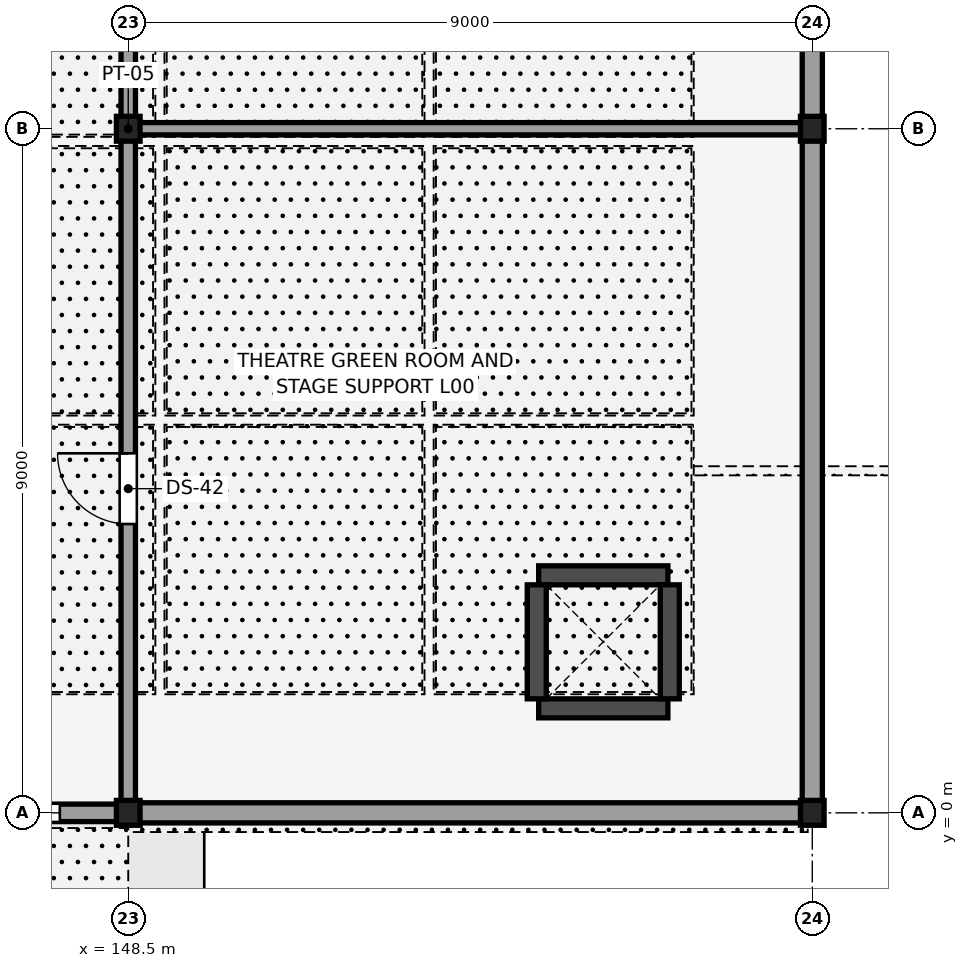
"""IFC4 building model, lengths in metres.
Left out: names, types, materials, properties, quantities, classifications, styles, units other than length and angle.
Written with IfcOpenShell. Run it as: python <this file> out.ifc"""

import sys

from ifc_helpers import new_model, si_unit, direction, frame, frame_2d, origin, origin_2d, place, context, subcontext, project, spatial, rectangle, i_section, extrude, element, fill, save


model = new_model("IFC4")
c1 = context("Model", 3, precision=1e-05, world=origin(), true_north=direction((0.0, 1.0)))
c2 = subcontext(c1, "Body", "Model", "MODEL_VIEW")
j1 = project(units=[si_unit("LENGTHUNIT", "METRE"), si_unit("PLANEANGLEUNIT", "RADIAN")], contexts=[c1])
p1 = place(None, origin())
s1 = spatial("IfcSite", under=j1, at=p1, CompositionType="ELEMENT")
p2 = place(p1, origin())
s2 = spatial("IfcBuilding", under=s1, at=p2, CompositionType="ELEMENT")
p3 = place(p2, origin())
s3 = spatial("IfcBuildingStorey", under=s2, at=p3, CompositionType="ELEMENT", Elevation=0.0)
for number, where, z_axis, x_axis in (
    (1, (148.5, 0.0, -0.24), (0.0, 0.0, 1.0), (1.0, 0.0, 0.0)),
    (2, (148.5, 9.0, -0.24), (0.0, 0.0, 1.0), (1.0, 0.0, 0.0)),
    (3, (157.5, 0.0, -0.24), (0.0, 0.0, 1.0), (1.0, 0.0, 0.0)),
    (4, (157.5, 9.0, -0.24), (0.0, 0.0, 1.0), (1.0, 0.0, 0.0)),
):
    element("IfcColumn", number, at=place(p3, frame(where, z_axis=z_axis, x_axis=x_axis)), inside=s3, PredefinedType="COLUMN", context=c2, shape_type="SweptSolid", body=[
        extrude(i_section(OverallWidth=0.311, OverallDepth=0.327, WebThickness=0.016, FlangeThickness=0.025, FilletRadius=0.017, at=origin_2d()), origin(), (0.0, 0.0, 1.0), 5.64),
    ])
for number, where, z_axis, x_axis in (
    (5, (153.9, 1.375, 0.0), (0.0, 0.0, 1.0), (1.0, 0.0, 0.0)),
    (6, (153.9, 3.125, 0.0), (0.0, 0.0, 1.0), (1.0, 0.0, 0.0)),
):
    element("IfcWall", number, at=place(p3, frame(where, z_axis=z_axis, x_axis=x_axis)), inside=s3, PredefinedType="SHEAR", context=c2, shape_type="SweptSolid", body=[
        extrude(rectangle(XDim=1.7, YDim=0.25, at=frame_2d((0.85, 0.0))), origin(), (0.0, 0.0, 1.0), 4.67),
    ])
for number, where, z_axis, x_axis in (
    (7, (153.875, 1.5, 0.0), (0.0, 0.0, 1.0), (0.0, 1.0, 0.0)),
    (8, (155.625, 1.5, 0.0), (0.0, 0.0, 1.0), (0.0, 1.0, 0.0)),
):
    element("IfcWall", number, at=place(p3, frame(where, z_axis=z_axis, x_axis=x_axis)), inside=s3, PredefinedType="SHEAR", context=c2, shape_type="SweptSolid", body=[
        extrude(rectangle(XDim=1.5, YDim=0.25, at=frame_2d((0.75, 0.0))), origin(), (0.0, 0.0, 1.0), 4.67),
    ])
p4 = place(p3, frame((139.5, 0.0, 0.0), z_axis=(0.0, 0.0, 1.0), x_axis=(1.0, 0.0, 0.0)))
e9 = element("IfcWall", 9, at=p4, inside=s3, PredefinedType="STANDARD", context=c2, shape_type="SweptSolid", body=[
    extrude(rectangle(XDim=9.0, YDim=0.23, at=frame_2d((4.5, 0.0))), origin(), (0.0, 0.0, 1.0), 5.22),
])
p5 = place(p4, frame((0.9, 0.0, 0.3)))
e10 = element("IfcOpeningElement", 10, at=p5, cuts=e9, PredefinedType="OPENING", context=c2, shape_type="SweptSolid", body=[
    extrude(rectangle(XDim=1.8, YDim=2.4, at=frame_2d((0.9, 1.2))), frame((0.0, 0.125, 0.0), z_axis=(0.0, -1.0, 0.0), x_axis=(1.0, 0.0, 0.0)), (0.0, 0.0, 1.0), 0.25),
])
p6 = place(p4, frame((6.3, 0.0, 0.3)))
e11 = element("IfcOpeningElement", 11, at=p6, cuts=e9, PredefinedType="OPENING", context=c2, shape_type="SweptSolid", body=[
    extrude(rectangle(XDim=1.8, YDim=2.4, at=frame_2d((0.9, 1.2))), frame((0.0, 0.125, 0.0), z_axis=(0.0, -1.0, 0.0), x_axis=(1.0, 0.0, 0.0)), (0.0, 0.0, 1.0), 0.25),
])
p7 = place(p4, frame((3.3, 0.0, 0.0)))
e12 = element("IfcOpeningElement", 12, at=p7, cuts=e9, PredefinedType="OPENING", context=c2, shape_type="SweptSolid", body=[
    extrude(rectangle(XDim=2.4, YDim=2.7, at=frame_2d((1.2, 1.35))), frame((0.0, 0.125, 0.0), z_axis=(0.0, -1.0, 0.0), x_axis=(1.0, 0.0, 0.0)), (0.0, 0.0, 1.0), 0.25),
])
p8 = place(p3, frame((148.5, 0.0, 0.0), z_axis=(0.0, 0.0, 1.0), x_axis=(1.0, 0.0, 0.0)))
e13 = element("IfcWall", 13, at=p8, inside=s3, PredefinedType="STANDARD", context=c2, shape_type="SweptSolid", body=[
    extrude(rectangle(XDim=9.0, YDim=0.265, at=frame_2d((4.5, 0.0))), origin(), (0.0, 0.0, 1.0), 5.22),
])
for number, where, z_axis, x_axis in (
    (14, (157.5, 0.0, 0.0), (0.0, 0.0, 1.0), (0.0, 1.0, 0.0)),
    (15, (157.5, 9.0, 0.0), (0.0, 0.0, 1.0), (0.0, 1.0, 0.0)),
):
    element("IfcWall", number, at=place(p3, frame(where, z_axis=z_axis, x_axis=x_axis)), inside=s3, PredefinedType="STANDARD", context=c2, shape_type="SweptSolid", body=[
        extrude(rectangle(XDim=9.0, YDim=0.265, at=frame_2d((4.5, 0.0))), origin(), (0.0, 0.0, 1.0), 4.681),
    ])
p9 = place(p3, frame((148.5, 0.0, 0.0), z_axis=(0.0, 0.0, 1.0), x_axis=(0.0, 1.0, 0.0)))
e16 = element("IfcWall", 16, at=p9, inside=s3, PredefinedType="PARTITIONING", context=c2, shape_type="SweptSolid", body=[
    extrude(rectangle(XDim=9.0, YDim=0.19, at=frame_2d((4.5, 0.0))), origin(), (0.0, 0.0, 1.0), 4.681),
])
p10 = place(p9, frame((3.8, 0.0, 0.0)))
e17 = element("IfcOpeningElement", 17, at=p10, cuts=e16, PredefinedType="OPENING", context=c2, shape_type="SweptSolid", body=[
    extrude(rectangle(XDim=0.93, YDim=2.275, at=frame_2d((0.465, 1.137))), frame((0.0, 0.105, 0.0), z_axis=(0.0, -1.0, 0.0), x_axis=(1.0, 0.0, 0.0)), (0.0, 0.0, 1.0), 0.21),
])
p11 = place(p3, frame((148.5, 9.0, 0.0), z_axis=(0.0, 0.0, 1.0), x_axis=(0.0, 1.0, 0.0)))
e18 = element("IfcWall", 18, at=p11, inside=s3, PredefinedType="PARTITIONING", context=c2, shape_type="SweptSolid", body=[
    extrude(rectangle(XDim=4.8, YDim=0.19, at=frame_2d((2.4, 0.0))), origin(), (0.0, 0.0, 1.0), 4.681),
])
p12 = place(p11, frame((1.5, 0.0, 0.0)))
e19 = element("IfcOpeningElement", 19, at=p12, cuts=e18, PredefinedType="OPENING", context=c2, shape_type="SweptSolid", body=[
    extrude(rectangle(XDim=1.6, YDim=2.325, at=frame_2d((0.8, 1.163))), frame((0.0, 0.105, 0.0), z_axis=(0.0, -1.0, 0.0), x_axis=(1.0, 0.0, 0.0)), (0.0, 0.0, 1.0), 0.21),
])
p13 = place(p3, frame((148.5, 9.0, 0.0), z_axis=(0.0, 0.0, 1.0), x_axis=(1.0, 0.0, 0.0)))
e20 = element("IfcWall", 20, at=p13, inside=s3, PredefinedType="PARTITIONING", context=c2, shape_type="SweptSolid", body=[
    extrude(rectangle(XDim=9.0, YDim=0.162, at=frame_2d((4.5, 0.0))), origin(), (0.0, 0.0, 1.0), 4.602),
])
p14 = place(p6, origin())
e21 = element("IfcWindow", 21, at=p14, inside=s3, PartitioningType="SINGLE_PANEL", PredefinedType="WINDOW", context=c2, shape_type="SweptSolid", body=[
    extrude(rectangle(XDim=1.8, YDim=2.4, at=frame_2d((0.9, 1.2))), frame((0.0, 0.03, 0.0), z_axis=(0.0, -1.0, 0.0), x_axis=(1.0, 0.0, 0.0)), (0.0, 0.0, 1.0), 0.06),
])
fill(e11, e21)
p15 = place(p10, origin())
e22 = element("IfcDoor", 22, at=p15, inside=s3, OperationType="SINGLE_SWING_RIGHT", PredefinedType="DOOR", context=c2, shape_type="SweptSolid", body=[
    extrude(rectangle(XDim=0.93, YDim=2.275, at=frame_2d((0.465, 1.137))), frame((0.0, 0.025, 0.0), z_axis=(0.0, -1.0, 0.0), x_axis=(1.0, 0.0, 0.0)), (0.0, 0.0, 1.0), 0.05),
])
fill(e17, e22)
save(model, sys.argv[1])
